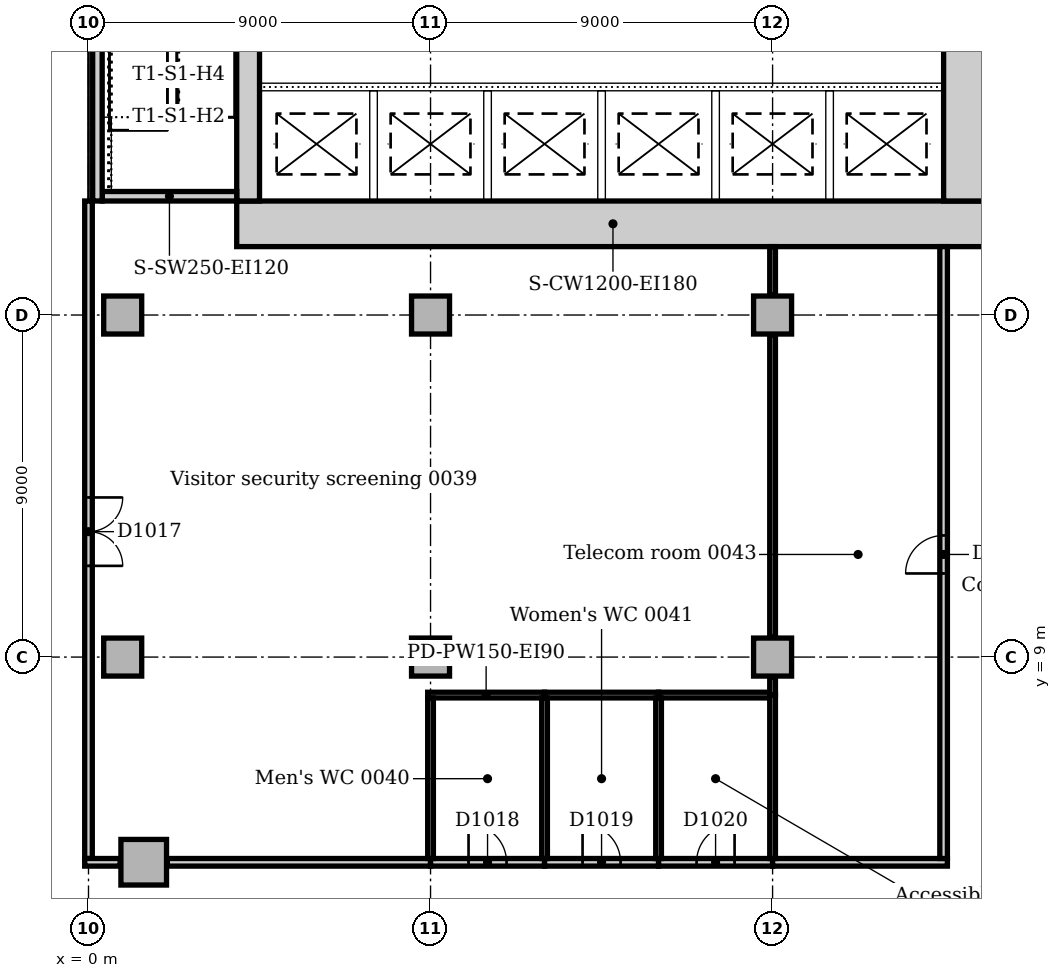
"""IFC4 building model, lengths in metres.
Left out: names, types, materials, properties, quantities, classifications, styles, units other than length and angle.
Written with IfcOpenShell. Run it as: python <this file> out.ifc"""

import sys

from ifc_helpers import new_model, si_unit, direction, frame, frame_2d, origin, origin_2d, place, context, subcontext, project, spatial, rectangle, extrude, element, fill, save


model = new_model("IFC4")
c1 = context("Model", 3, precision=1e-05, world=origin(), true_north=direction((0.0, 1.0)))
c2 = subcontext(c1, "Body", "Model", "MODEL_VIEW")
j1 = project(units=[si_unit("LENGTHUNIT", "METRE"), si_unit("PLANEANGLEUNIT", "RADIAN")], contexts=[c1])
p1 = place(None, origin())
s1 = spatial("IfcSite", under=j1, at=p1, CompositionType="ELEMENT")
p2 = place(p1, origin())
s2 = spatial("IfcBuilding", under=s1, at=p2, CompositionType="ELEMENT")
p3 = place(p2, origin())
s3 = spatial("IfcBuildingStorey", under=s2, at=p3, CompositionType="ELEMENT", Elevation=0.0)
p4 = place(p3, frame((3.9, 20.4, 0.0), z_axis=(0.0, 0.0, 1.0), x_axis=(1.0, 0.0, 0.0)))
e1 = element("IfcWall", 1, at=p4, inside=s3, PredefinedType="SOLIDWALL", context=c2, shape_type="SweptSolid", body=[
    extrude(rectangle(XDim=19.8, YDim=1.2, at=frame_2d((9.9, 0.0))), origin(), (0.0, 0.0, 1.0), 6.0),
])
p5 = place(p3, frame((23.1, 21.0, 0.0), z_axis=(0.0, 0.0, 1.0), x_axis=(0.0, 1.0, 0.0)))
e2 = element("IfcWall", 2, at=p5, inside=s3, PredefinedType="SOLIDWALL", context=c2, shape_type="SweptSolid", body=[
    extrude(rectangle(XDim=10.5, YDim=1.2, at=frame_2d((5.25, 0.0))), origin(), (0.0, 0.0, 1.0), 6.0),
])
p6 = place(p5, frame((4.35, 0.0, 0.0)))
e3 = element("IfcOpeningElement", 3, at=p6, cuts=e2, PredefinedType="OPENING", context=c2, shape_type="SweptSolid", body=[
    extrude(rectangle(XDim=1.8, YDim=2.1, at=frame_2d((0.9, 1.05))), frame((0.0, 0.61, 0.0), z_axis=(0.0, -1.0, 0.0), x_axis=(1.0, 0.0, 0.0)), (0.0, 0.0, 1.0), 1.22),
])
p7 = place(p3, frame((4.2, 31.5, 0.0), z_axis=(0.0, 0.0, 1.0), x_axis=(0.0, -1.0, 0.0)))
e4 = element("IfcWall", 4, at=p7, inside=s3, PredefinedType="SOLIDWALL", context=c2, shape_type="SweptSolid", body=[
    extrude(rectangle(XDim=10.5, YDim=0.6, at=frame_2d((5.25, 0.0))), origin(), (0.0, 0.0, 1.0), 6.0),
])
p8 = place(p7, frame((4.25, 0.0, 0.0)))
e5 = element("IfcOpeningElement", 5, at=p8, cuts=e4, PredefinedType="OPENING", context=c2, shape_type="SweptSolid", body=[
    extrude(rectangle(XDim=1.0, YDim=2.1, at=frame_2d((0.5, 1.05))), frame((0.0, 0.31, 0.0), z_axis=(0.0, -1.0, 0.0), x_axis=(1.0, 0.0, 0.0)), (0.0, 0.0, 1.0), 0.62),
])
p9 = place(p3, frame((0.36, 21.125, 0.0), z_axis=(0.0, 0.0, 1.0), x_axis=(1.0, 0.0, 0.0)))
e6 = element("IfcWall", 6, at=p9, inside=s3, PredefinedType="SOLIDWALL", context=c2, shape_type="SweptSolid", body=[
    extrude(rectangle(XDim=3.54, YDim=0.25, at=frame_2d((1.77, 0.0))), origin(), (0.0, 0.0, 1.0), 6.0),
])
p10 = place(p3, frame((0.235, 21.0, 0.0), z_axis=(0.0, 0.0, 1.0), x_axis=(0.0, 1.0, 0.0)))
e7 = element("IfcWall", 7, at=p10, inside=s3, PredefinedType="SOLIDWALL", context=c2, shape_type="SweptSolid", body=[
    extrude(rectangle(XDim=21.0, YDim=0.25, at=frame_2d((10.5, 0.0))), origin(), (0.0, 0.0, 1.0), 6.0),
])
p11 = place(p10, frame((10.0, 0.0, 0.0)))
e8 = element("IfcOpeningElement", 8, at=p11, cuts=e7, PredefinedType="OPENING", context=c2, shape_type="SweptSolid", body=[
    extrude(rectangle(XDim=1.0, YDim=2.1, at=frame_2d((0.5, 1.05))), frame((0.0, 0.135, 0.0), z_axis=(0.0, -1.0, 0.0), x_axis=(1.0, 0.0, 0.0)), (0.0, 0.0, 1.0), 0.27),
])
p12 = place(p3, frame((1.453, 3.602, 0.0), z_axis=(0.0, 0.0, 1.0), x_axis=(1.0, 0.0, 0.0)))
e9 = element("IfcColumn", 9, at=p12, inside=s3, PredefinedType="COLUMN", context=c2, shape_type="SweptSolid", body=[
    extrude(rectangle(XDim=1.2, YDim=1.2, at=origin_2d()), origin(), (0.0, 0.0, 1.0), 5.7),
])
for number, where, z_axis, x_axis in (
    (10, (0.9, 9.0, 0.0), (0.0, 0.0, 1.0), (1.0, 0.0, 0.0)),
    (11, (0.9, 18.0, 0.0), (0.0, 0.0, 1.0), (1.0, 0.0, 0.0)),
    (12, (9.0, 9.0, 0.0), (0.0, 0.0, 1.0), (1.0, 0.0, 0.0)),
    (13, (9.0, 18.0, 0.0), (0.0, 0.0, 1.0), (1.0, 0.0, 0.0)),
    (14, (18.0, 9.0, 0.0), (0.0, 0.0, 1.0), (1.0, 0.0, 0.0)),
    (15, (18.0, 18.0, 0.0), (0.0, 0.0, 1.0), (1.0, 0.0, 0.0)),
):
    element("IfcColumn", number, at=place(p3, frame(where, z_axis=z_axis, x_axis=x_axis)), inside=s3, PredefinedType="COLUMN", context=c2, shape_type="SweptSolid", body=[
        extrude(rectangle(XDim=1.0, YDim=1.0, at=origin_2d()), origin(), (0.0, 0.0, 1.0), 5.7),
    ])
p13 = place(p3, frame((0.0, 3.7, 0.0), z_axis=(0.0, 0.0, 1.0), x_axis=(0.0, 1.0, 0.0)))
e16 = element("IfcWall", 16, at=p13, inside=s3, PredefinedType="PARTITIONING", context=c2, shape_type="SweptSolid", body=[
    extrude(rectangle(XDim=17.3, YDim=0.2, at=frame_2d((8.65, 0.0))), origin(), (0.0, 0.0, 1.0), 5.7),
])
p14 = place(p13, frame((7.7, 0.0, 0.0)))
e17 = element("IfcOpeningElement", 17, at=p14, cuts=e16, PredefinedType="OPENING", context=c2, shape_type="SweptSolid", body=[
    extrude(rectangle(XDim=1.8, YDim=2.1, at=frame_2d((0.9, 1.05))), frame((0.0, 0.11, 0.0), z_axis=(0.0, -1.0, 0.0), x_axis=(1.0, 0.0, 0.0)), (0.0, 0.0, 1.0), 0.22),
])
p15 = place(p3, frame((-0.1, 3.6, 0.0), z_axis=(0.0, 0.0, 1.0), x_axis=(1.0, 0.0, 0.0)))
e18 = element("IfcWall", 18, at=p15, inside=s3, PredefinedType="PARTITIONING", context=c2, shape_type="SweptSolid", body=[
    extrude(rectangle(XDim=0.933, YDim=0.2, at=frame_2d((0.467, 0.0))), origin(), (0.0, 0.0, 1.0), 5.7),
])
p16 = place(p3, frame((2.073, 3.6, 0.0), z_axis=(0.0, 0.0, 1.0), x_axis=(1.0, 0.0, 0.0)))
e19 = element("IfcWall", 19, at=p16, inside=s3, PredefinedType="PARTITIONING", context=c2, shape_type="SweptSolid", body=[
    extrude(rectangle(XDim=6.927, YDim=0.2, at=frame_2d((3.463, 0.0))), origin(), (0.0, 0.0, 1.0), 5.7),
])
p17 = place(p3, frame((9.0, 3.6, 0.0), z_axis=(0.0, 0.0, 1.0), x_axis=(1.0, 0.0, 0.0)))
e20 = element("IfcWall", 20, at=p17, inside=s3, PredefinedType="PARTITIONING", context=c2, shape_type="SweptSolid", body=[
    extrude(rectangle(XDim=3.0, YDim=0.2, at=frame_2d((1.5, 0.0))), origin(), (0.0, 0.0, 1.0), 5.7),
])
p18 = place(p17, frame((1.0, 0.0, 0.0)))
e21 = element("IfcOpeningElement", 21, at=p18, cuts=e20, PredefinedType="OPENING", context=c2, shape_type="SweptSolid", body=[
    extrude(rectangle(XDim=1.0, YDim=2.1, at=frame_2d((0.5, 1.05))), frame((0.0, 0.11, 0.0), z_axis=(0.0, -1.0, 0.0), x_axis=(1.0, 0.0, 0.0)), (0.0, 0.0, 1.0), 0.22),
])
p19 = place(p3, frame((12.0, 3.6, 0.0), z_axis=(0.0, 0.0, 1.0), x_axis=(1.0, 0.0, 0.0)))
e22 = element("IfcWall", 22, at=p19, inside=s3, PredefinedType="PARTITIONING", context=c2, shape_type="SweptSolid", body=[
    extrude(rectangle(XDim=3.0, YDim=0.2, at=frame_2d((1.5, 0.0))), origin(), (0.0, 0.0, 1.0), 5.7),
])
p20 = place(p19, frame((1.0, 0.0, 0.0)))
e23 = element("IfcOpeningElement", 23, at=p20, cuts=e22, PredefinedType="OPENING", context=c2, shape_type="SweptSolid", body=[
    extrude(rectangle(XDim=1.0, YDim=2.1, at=frame_2d((0.5, 1.05))), frame((0.0, 0.11, 0.0), z_axis=(0.0, -1.0, 0.0), x_axis=(1.0, 0.0, 0.0)), (0.0, 0.0, 1.0), 0.22),
])
p21 = place(p3, frame((15.0, 3.6, 0.0), z_axis=(0.0, 0.0, 1.0), x_axis=(1.0, 0.0, 0.0)))
e24 = element("IfcWall", 24, at=p21, inside=s3, PredefinedType="PARTITIONING", context=c2, shape_type="SweptSolid", body=[
    extrude(rectangle(XDim=3.0, YDim=0.2, at=frame_2d((1.5, 0.0))), origin(), (0.0, 0.0, 1.0), 5.7),
])
p22 = place(p21, frame((1.0, 0.0, 0.0)))
e25 = element("IfcOpeningElement", 25, at=p22, cuts=e24, PredefinedType="OPENING", context=c2, shape_type="SweptSolid", body=[
    extrude(rectangle(XDim=1.0, YDim=2.1, at=frame_2d((0.5, 1.05))), frame((0.0, 0.11, 0.0), z_axis=(0.0, -1.0, 0.0), x_axis=(1.0, 0.0, 0.0)), (0.0, 0.0, 1.0), 0.22),
])
p23 = place(p3, frame((18.0, 3.6, 0.0), z_axis=(0.0, 0.0, 1.0), x_axis=(1.0, 0.0, 0.0)))
e26 = element("IfcWall", 26, at=p23, inside=s3, PredefinedType="PARTITIONING", context=c2, shape_type="SweptSolid", body=[
    extrude(rectangle(XDim=4.6, YDim=0.2, at=frame_2d((2.3, 0.0))), origin(), (0.0, 0.0, 1.0), 5.7),
])
p24 = place(p3, frame((22.5, 3.7, 0.0), z_axis=(0.0, 0.0, 1.0), x_axis=(0.0, 1.0, 0.0)))
e27 = element("IfcWall", 27, at=p24, inside=s3, PredefinedType="PARTITIONING", context=c2, shape_type="SweptSolid", body=[
    extrude(rectangle(XDim=16.1, YDim=0.2, at=frame_2d((8.05, 0.0))), origin(), (0.0, 0.0, 1.0), 5.7),
])
p25 = place(p24, frame((7.5, 0.0, 0.0)))
e28 = element("IfcOpeningElement", 28, at=p25, cuts=e27, PredefinedType="OPENING", context=c2, shape_type="SweptSolid", body=[
    extrude(rectangle(XDim=1.0, YDim=2.1, at=frame_2d((0.5, 1.05))), frame((0.0, 0.11, 0.0), z_axis=(0.0, -1.0, 0.0), x_axis=(1.0, 0.0, 0.0)), (0.0, 0.0, 1.0), 0.22),
])
p26 = place(p3, frame((8.925, 8.0, 0.0), z_axis=(0.0, 0.0, 1.0), x_axis=(1.0, 0.0, 0.0)))
e29 = element("IfcWall", 29, at=p26, inside=s3, PredefinedType="PARTITIONING", context=c2, shape_type="SweptSolid", body=[
    extrude(rectangle(XDim=3.075, YDim=0.15, at=frame_2d((1.538, 0.0))), origin(), (0.0, 0.0, 1.0), 5.7),
])
p27 = place(p3, frame((9.0, 3.7, 0.0), z_axis=(0.0, 0.0, 1.0), x_axis=(0.0, 1.0, 0.0)))
e30 = element("IfcWall", 30, at=p27, inside=s3, PredefinedType="PARTITIONING", context=c2, shape_type="SweptSolid", body=[
    extrude(rectangle(XDim=4.225, YDim=0.15, at=frame_2d((2.112, 0.0))), origin(), (0.0, 0.0, 1.0), 5.7),
])
p28 = place(p3, frame((12.0, 8.0, 0.0), z_axis=(0.0, 0.0, 1.0), x_axis=(1.0, 0.0, 0.0)))
e31 = element("IfcWall", 31, at=p28, inside=s3, PredefinedType="PARTITIONING", context=c2, shape_type="SweptSolid", body=[
    extrude(rectangle(XDim=3.0, YDim=0.15, at=frame_2d((1.5, 0.0))), origin(), (0.0, 0.0, 1.0), 5.7),
])
p29 = place(p3, frame((15.0, 8.0, 0.0), z_axis=(0.0, 0.0, 1.0), x_axis=(1.0, 0.0, 0.0)))
e32 = element("IfcWall", 32, at=p29, inside=s3, PredefinedType="PARTITIONING", context=c2, shape_type="SweptSolid", body=[
    extrude(rectangle(XDim=2.925, YDim=0.15, at=frame_2d((1.462, 0.0))), origin(), (0.0, 0.0, 1.0), 5.7),
])
p30 = place(p3, frame((18.0, 8.0, 0.0), z_axis=(0.0, 0.0, 1.0), x_axis=(0.0, 1.0, 0.0)))
e33 = element("IfcWall", 33, at=p30, inside=s3, PredefinedType="PARTITIONING", context=c2, shape_type="SweptSolid", body=[
    extrude(rectangle(XDim=0.48, YDim=0.15, at=frame_2d((0.24, 0.0))), origin(), (0.0, 0.0, 1.0), 5.7),
])
p31 = place(p3, frame((18.0, 9.52, 0.0), z_axis=(0.0, 0.0, 1.0), x_axis=(0.0, 1.0, 0.0)))
e34 = element("IfcWall", 34, at=p31, inside=s3, PredefinedType="PARTITIONING", context=c2, shape_type="SweptSolid", body=[
    extrude(rectangle(XDim=7.96, YDim=0.15, at=frame_2d((3.98, 0.0))), origin(), (0.0, 0.0, 1.0), 5.7),
])
p32 = place(p3, frame((18.0, 18.52, 0.0), z_axis=(0.0, 0.0, 1.0), x_axis=(0.0, 1.0, 0.0)))
e35 = element("IfcWall", 35, at=p32, inside=s3, PredefinedType="PARTITIONING", context=c2, shape_type="SweptSolid", body=[
    extrude(rectangle(XDim=1.28, YDim=0.15, at=frame_2d((0.64, 0.0))), origin(), (0.0, 0.0, 1.0), 5.7),
])
for number, where, z_axis, x_axis in (
    (36, (12.0, 3.7, 0.0), (0.0, 0.0, 1.0), (0.0, 1.0, 0.0)),
    (37, (15.0, 3.7, 0.0), (0.0, 0.0, 1.0), (0.0, 1.0, 0.0)),
):
    element("IfcWall", number, at=place(p3, frame(where, z_axis=z_axis, x_axis=x_axis)), inside=s3, PredefinedType="PARTITIONING", context=c2, shape_type="SweptSolid", body=[
        extrude(rectangle(XDim=4.225, YDim=0.15, at=frame_2d((2.112, 0.0))), origin(), (0.0, 0.0, 1.0), 5.7),
    ])
p33 = place(p3, frame((18.0, 3.7, 0.0), z_axis=(0.0, 0.0, 1.0), x_axis=(0.0, 1.0, 0.0)))
e38 = element("IfcWall", 38, at=p33, inside=s3, PredefinedType="PARTITIONING", context=c2, shape_type="SweptSolid", body=[
    extrude(rectangle(XDim=4.3, YDim=0.15, at=frame_2d((2.15, 0.0))), origin(), (0.0, 0.0, 1.0), 5.7),
])
p34 = place(p3, frame((0.48, 21.25, 0.0), z_axis=(0.0, 0.0, 1.0), x_axis=(0.0, 1.0, 0.0)))
e39 = element("IfcWall", 39, at=p34, inside=s3, PredefinedType="STANDARD", context=c2, shape_type="SweptSolid", body=[
    extrude(rectangle(XDim=1.955, YDim=0.24, at=frame_2d((0.978, 0.0))), origin(), (0.0, 0.0, 1.0), 6.0),
])
p35 = place(p3, frame((4.5, 24.0, 0.0), z_axis=(0.0, 0.0, 1.0), x_axis=(1.0, 0.0, 0.0)))
e40 = element("IfcWall", 40, at=p35, inside=s3, PredefinedType="PARTITIONING", context=c2, shape_type="SweptSolid", body=[
    extrude(rectangle(XDim=18.0, YDim=0.2, at=frame_2d((9.0, 0.0))), origin(), (0.0, 0.0, 1.0), 5.7),
])
p36 = place(p35, frame((0.95, 0.0, 0.0)))
e41 = element("IfcOpeningElement", 41, at=p36, cuts=e40, PredefinedType="OPENING", context=c2, shape_type="SweptSolid", body=[
    extrude(rectangle(XDim=1.1, YDim=2.1, at=frame_2d((0.55, 1.05))), frame((0.0, 0.11, 0.0), z_axis=(0.0, -1.0, 0.0), x_axis=(1.0, 0.0, 0.0)), (0.0, 0.0, 1.0), 0.22),
])
p37 = place(p35, frame((3.95, 0.0, 0.0)))
e42 = element("IfcOpeningElement", 42, at=p37, cuts=e40, PredefinedType="OPENING", context=c2, shape_type="SweptSolid", body=[
    extrude(rectangle(XDim=1.1, YDim=2.1, at=frame_2d((0.55, 1.05))), frame((0.0, 0.11, 0.0), z_axis=(0.0, -1.0, 0.0), x_axis=(1.0, 0.0, 0.0)), (0.0, 0.0, 1.0), 0.22),
])
p38 = place(p35, frame((6.95, 0.0, 0.0)))
e43 = element("IfcOpeningElement", 43, at=p38, cuts=e40, PredefinedType="OPENING", context=c2, shape_type="SweptSolid", body=[
    extrude(rectangle(XDim=1.1, YDim=2.1, at=frame_2d((0.55, 1.05))), frame((0.0, 0.11, 0.0), z_axis=(0.0, -1.0, 0.0), x_axis=(1.0, 0.0, 0.0)), (0.0, 0.0, 1.0), 0.22),
])
p39 = place(p35, frame((9.95, 0.0, 0.0)))
e44 = element("IfcOpeningElement", 44, at=p39, cuts=e40, PredefinedType="OPENING", context=c2, shape_type="SweptSolid", body=[
    extrude(rectangle(XDim=1.1, YDim=2.1, at=frame_2d((0.55, 1.05))), frame((0.0, 0.11, 0.0), z_axis=(0.0, -1.0, 0.0), x_axis=(1.0, 0.0, 0.0)), (0.0, 0.0, 1.0), 0.22),
])
p40 = place(p35, frame((12.95, 0.0, 0.0)))
e45 = element("IfcOpeningElement", 45, at=p40, cuts=e40, PredefinedType="OPENING", context=c2, shape_type="SweptSolid", body=[
    extrude(rectangle(XDim=1.1, YDim=2.1, at=frame_2d((0.55, 1.05))), frame((0.0, 0.11, 0.0), z_axis=(0.0, -1.0, 0.0), x_axis=(1.0, 0.0, 0.0)), (0.0, 0.0, 1.0), 0.22),
])
p41 = place(p35, frame((15.95, 0.0, 0.0)))
e46 = element("IfcOpeningElement", 46, at=p41, cuts=e40, PredefinedType="OPENING", context=c2, shape_type="SweptSolid", body=[
    extrude(rectangle(XDim=1.1, YDim=2.1, at=frame_2d((0.55, 1.05))), frame((0.0, 0.11, 0.0), z_axis=(0.0, -1.0, 0.0), x_axis=(1.0, 0.0, 0.0)), (0.0, 0.0, 1.0), 0.22),
])
for number, where, z_axis, x_axis in (
    (47, (7.5, 21.0, 0.0), (0.0, 0.0, 1.0), (0.0, 1.0, 0.0)),
    (48, (10.5, 21.0, 0.0), (0.0, 0.0, 1.0), (0.0, 1.0, 0.0)),
    (49, (13.5, 21.0, 0.0), (0.0, 0.0, 1.0), (0.0, 1.0, 0.0)),
    (50, (16.5, 21.0, 0.0), (0.0, 0.0, 1.0), (0.0, 1.0, 0.0)),
    (51, (19.5, 21.0, 0.0), (0.0, 0.0, 1.0), (0.0, 1.0, 0.0)),
):
    element("IfcWall", number, at=place(p3, frame(where, z_axis=z_axis, x_axis=x_axis)), inside=s3, PredefinedType="PARTITIONING", context=c2, shape_type="SweptSolid", body=[
        extrude(rectangle(XDim=2.9, YDim=0.2, at=frame_2d((1.45, 0.0))), origin(), (0.0, 0.0, 1.0), 5.7),
    ])
p42 = place(p14, frame((1.8, 0.0, 0.0), z_axis=(0.0, 0.0, 1.0), x_axis=(-1.0, 0.0, 0.0)))
e52 = element("IfcDoor", 52, at=p42, inside=s3, OperationType="DOUBLE_DOOR_SINGLE_SWING", PredefinedType="DOOR", context=c2, shape_type="SweptSolid", body=[
    extrude(rectangle(XDim=1.8, YDim=2.1, at=frame_2d((0.9, 1.05))), frame((0.0, 0.025, 0.0), z_axis=(0.0, -1.0, 0.0), x_axis=(1.0, 0.0, 0.0)), (0.0, 0.0, 1.0), 0.05),
])
fill(e17, e52)
p43 = place(p18, origin())
e53 = element("IfcDoor", 53, at=p43, inside=s3, OperationType="SINGLE_SWING_LEFT", PredefinedType="DOOR", context=c2, shape_type="SweptSolid", body=[
    extrude(rectangle(XDim=1.0, YDim=2.1, at=frame_2d((0.5, 1.05))), frame((0.0, 0.025, 0.0), z_axis=(0.0, -1.0, 0.0), x_axis=(1.0, 0.0, 0.0)), (0.0, 0.0, 1.0), 0.05),
])
fill(e21, e53)
p44 = place(p20, origin())
e54 = element("IfcDoor", 54, at=p44, inside=s3, OperationType="SINGLE_SWING_LEFT", PredefinedType="DOOR", context=c2, shape_type="SweptSolid", body=[
    extrude(rectangle(XDim=1.0, YDim=2.1, at=frame_2d((0.5, 1.05))), frame((0.0, 0.025, 0.0), z_axis=(0.0, -1.0, 0.0), x_axis=(1.0, 0.0, 0.0)), (0.0, 0.0, 1.0), 0.05),
])
fill(e23, e54)
p45 = place(p22, origin())
e55 = element("IfcDoor", 55, at=p45, inside=s3, OperationType="SINGLE_SWING_RIGHT", PredefinedType="DOOR", context=c2, shape_type="SweptSolid", body=[
    extrude(rectangle(XDim=1.0, YDim=2.1, at=frame_2d((0.5, 1.05))), frame((0.0, 0.025, 0.0), z_axis=(0.0, -1.0, 0.0), x_axis=(1.0, 0.0, 0.0)), (0.0, 0.0, 1.0), 0.05),
])
fill(e25, e55)
p46 = place(p25, origin())
e56 = element("IfcDoor", 56, at=p46, inside=s3, OperationType="SINGLE_SWING_LEFT", PredefinedType="DOOR", context=c2, shape_type="SweptSolid", body=[
    extrude(rectangle(XDim=1.0, YDim=2.1, at=frame_2d((0.5, 1.05))), frame((0.0, 0.025, 0.0), z_axis=(0.0, -1.0, 0.0), x_axis=(1.0, 0.0, 0.0)), (0.0, 0.0, 1.0), 0.05),
])
fill(e28, e56)
p47 = place(p36, origin())
e57 = element("IfcDoor", 57, at=p47, inside=s3, OperationType="SLIDING_TO_LEFT", PredefinedType="DOOR", context=c2, shape_type="SweptSolid", body=[
    extrude(rectangle(XDim=1.1, YDim=2.1, at=frame_2d((0.55, 1.05))), frame((0.0, 0.025, 0.0), z_axis=(0.0, -1.0, 0.0), x_axis=(1.0, 0.0, 0.0)), (0.0, 0.0, 1.0), 0.05),
])
fill(e41, e57)
p48 = place(p37, origin())
e58 = element("IfcDoor", 58, at=p48, inside=s3, OperationType="SLIDING_TO_LEFT", PredefinedType="DOOR", context=c2, shape_type="SweptSolid", body=[
    extrude(rectangle(XDim=1.1, YDim=2.1, at=frame_2d((0.55, 1.05))), frame((0.0, 0.025, 0.0), z_axis=(0.0, -1.0, 0.0), x_axis=(1.0, 0.0, 0.0)), (0.0, 0.0, 1.0), 0.05),
])
fill(e42, e58)
p49 = place(p38, origin())
e59 = element("IfcDoor", 59, at=p49, inside=s3, OperationType="SLIDING_TO_LEFT", PredefinedType="DOOR", context=c2, shape_type="SweptSolid", body=[
    extrude(rectangle(XDim=1.1, YDim=2.1, at=frame_2d((0.55, 1.05))), frame((0.0, 0.025, 0.0), z_axis=(0.0, -1.0, 0.0), x_axis=(1.0, 0.0, 0.0)), (0.0, 0.0, 1.0), 0.05),
])
fill(e43, e59)
p50 = place(p39, origin())
e60 = element("IfcDoor", 60, at=p50, inside=s3, OperationType="SLIDING_TO_LEFT", PredefinedType="DOOR", context=c2, shape_type="SweptSolid", body=[
    extrude(rectangle(XDim=1.1, YDim=2.1, at=frame_2d((0.55, 1.05))), frame((0.0, 0.025, 0.0), z_axis=(0.0, -1.0, 0.0), x_axis=(1.0, 0.0, 0.0)), (0.0, 0.0, 1.0), 0.05),
])
fill(e44, e60)
p51 = place(p40, origin())
e61 = element("IfcDoor", 61, at=p51, inside=s3, OperationType="SLIDING_TO_LEFT", PredefinedType="DOOR", context=c2, shape_type="SweptSolid", body=[
    extrude(rectangle(XDim=1.1, YDim=2.1, at=frame_2d((0.55, 1.05))), frame((0.0, 0.025, 0.0), z_axis=(0.0, -1.0, 0.0), x_axis=(1.0, 0.0, 0.0)), (0.0, 0.0, 1.0), 0.05),
])
fill(e45, e61)
p52 = place(p41, origin())
e62 = element("IfcDoor", 62, at=p52, inside=s3, OperationType="SLIDING_TO_LEFT", PredefinedType="DOOR", context=c2, shape_type="SweptSolid", body=[
    extrude(rectangle(XDim=1.1, YDim=2.1, at=frame_2d((0.55, 1.05))), frame((0.0, 0.025, 0.0), z_axis=(0.0, -1.0, 0.0), x_axis=(1.0, 0.0, 0.0)), (0.0, 0.0, 1.0), 0.05),
])
fill(e46, e62)
save(model, sys.argv[1])
